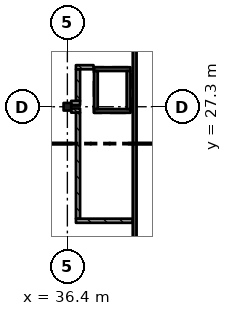
"""IFC4 building model, lengths in metres.
Left out: names, types, materials, properties, quantities, classifications, styles, units other than length and angle.
Written with IfcOpenShell. Run it as: python <this file> out.ifc"""

import sys

from ifc_helpers import new_model, si_unit, direction, frame, frame_2d, origin, origin_2d, place, context, subcontext, project, spatial, rectangle, extrude, element, fill, save


model = new_model("IFC4")
c1 = context("Model", 3, precision=1e-05, world=origin(), true_north=direction((0.0, 1.0)))
c2 = subcontext(c1, "Body", "Model", "MODEL_VIEW")
j1 = project(units=[si_unit("LENGTHUNIT", "METRE"), si_unit("PLANEANGLEUNIT", "RADIAN")], contexts=[c1])
p1 = place(None, origin())
s1 = spatial("IfcSite", under=j1, at=p1, CompositionType="ELEMENT")
p2 = place(p1, origin())
s2 = spatial("IfcBuilding", under=s1, at=p2, CompositionType="ELEMENT")
p3 = place(p2, frame((0.0, 0.0, 29.12)))
s3 = spatial("IfcBuildingStorey", under=s2, at=p3, CompositionType="ELEMENT", Elevation=29.12)
p4 = place(p3, frame((36.4, 27.3, 0.0), z_axis=(0.0, 0.0, 1.0), x_axis=(1.0, 0.0, 0.0)))
e1 = element("IfcColumn", 1, at=p4, inside=s3, PredefinedType="COLUMN", context=c2, shape_type="SweptSolid", body=[
    extrude(rectangle(XDim=0.5, YDim=0.5, at=origin_2d()), origin(), (0.0, 0.0, 1.0), 4.55),
])
p5 = place(p3, frame((40.825, 40.95, 0.0), z_axis=(0.0, 0.0, 1.0), x_axis=(0.0, -1.0, 0.0)))
e2 = element("IfcWall", 2, at=p5, inside=s3, PredefinedType="SHEAR", context=c2, shape_type="SweptSolid", body=[
    extrude(rectangle(XDim=40.775, YDim=0.25, at=frame_2d((20.387, 0.0))), origin(), (0.0, 0.0, 1.0), 4.55),
])
p6 = place(p3, frame((40.55, 27.025, 0.0), z_axis=(0.0, 0.0, 1.0), x_axis=(-1.0, 0.0, 0.0)))
e3 = element("IfcWall", 3, at=p6, inside=s3, PredefinedType="SHEAR", context=c2, shape_type="SweptSolid", body=[
    extrude(rectangle(XDim=2.4, YDim=0.25, at=frame_2d((1.2, 0.0))), origin(), (0.0, 0.0, 1.0), 4.55),
])
p7 = place(p6, frame((0.75, 0.0, 0.0)))
e4 = element("IfcOpeningElement", 4, at=p7, cuts=e3, PredefinedType="OPENING", context=c2, shape_type="SweptSolid", body=[
    extrude(rectangle(XDim=0.9, YDim=2.1, at=frame_2d((0.45, 1.05))), frame((0.0, 0.135, 0.0), z_axis=(0.0, -1.0, 0.0), x_axis=(1.0, 0.0, 0.0)), (0.0, 0.0, 1.0), 0.27),
])
p8 = place(p3, frame((40.55, 29.775, 0.0), z_axis=(0.0, 0.0, 1.0), x_axis=(-1.0, 0.0, 0.0)))
e5 = element("IfcWall", 5, at=p8, inside=s3, PredefinedType="SHEAR", context=c2, shape_type="SweptSolid", body=[
    extrude(rectangle(XDim=2.4, YDim=0.25, at=frame_2d((1.2, 0.0))), origin(), (0.0, 0.0, 1.0), 4.55),
])
for number, where, z_axis, x_axis in (
    (6, (38.275, 29.65, 0.0), (0.0, 0.0, 1.0), (0.0, -1.0, 0.0)),
    (7, (40.425, 29.65, 0.0), (0.0, 0.0, 1.0), (0.0, -1.0, 0.0)),
):
    element("IfcWall", number, at=place(p3, frame(where, z_axis=z_axis, x_axis=x_axis)), inside=s3, PredefinedType="SHEAR", context=c2, shape_type="SweptSolid", body=[
        extrude(rectangle(XDim=2.5, YDim=0.25, at=frame_2d((1.25, 0.0))), origin(), (0.0, 0.0, 1.0), 4.55),
    ])
p9 = place(p3, frame((36.65, 27.05, 0.0), z_axis=(0.0, 0.0, 1.0), x_axis=(1.0, 0.0, 0.0)))
e8 = element("IfcWall", 8, at=p9, inside=s3, PredefinedType="SOLIDWALL", context=c2, shape_type="SweptSolid", body=[
    extrude(rectangle(XDim=0.588, YDim=0.275, at=frame_2d((0.294, 0.0))), origin(), (0.0, 0.0, 1.0), 3.88),
])
p10 = place(p3, frame((36.962, 19.8, 0.0), z_axis=(0.0, 0.0, 1.0), x_axis=(1.0, 0.0, 0.0)))
e9 = element("IfcWall", 9, at=p10, inside=s3, PredefinedType="SOLIDWALL", context=c2, shape_type="SweptSolid", body=[
    extrude(rectangle(XDim=3.738, YDim=0.275, at=frame_2d((1.869, 0.0))), origin(), (0.0, 0.0, 1.0), 3.88),
])
p11 = place(p10, frame((1.25, 0.0, 0.0)))
e10 = element("IfcOpeningElement", 10, at=p11, cuts=e9, PredefinedType="OPENING", context=c2, shape_type="SweptSolid", body=[
    extrude(rectangle(XDim=1.2, YDim=2.4, at=frame_2d((0.6, 1.2))), frame((0.0, 0.147, 0.0), z_axis=(0.0, -1.0, 0.0), x_axis=(1.0, 0.0, 0.0)), (0.0, 0.0, 1.0), 0.295),
])
p12 = place(p3, frame((36.962, 29.9, 0.0), z_axis=(0.0, 0.0, 1.0), x_axis=(1.0, 0.0, 0.0)))
e11 = element("IfcWall", 11, at=p12, inside=s3, PredefinedType="SOLIDWALL", context=c2, shape_type="SweptSolid", body=[
    extrude(rectangle(XDim=1.158, YDim=0.275, at=frame_2d((0.579, 0.0))), origin(), (0.0, 0.0, 1.0), 3.88),
])
p13 = place(p3, frame((37.1, 26.913, 0.0), z_axis=(0.0, 0.0, 1.0), x_axis=(0.0, -1.0, 0.0)))
e12 = element("IfcWall", 12, at=p13, inside=s3, PredefinedType="SOLIDWALL", context=c2, shape_type="SweptSolid", body=[
    extrude(rectangle(XDim=6.975, YDim=0.275, at=frame_2d((3.488, 0.0))), origin(), (0.0, 0.0, 1.0), 3.88),
])
p14 = place(p3, frame((37.1, 29.762, 0.0), z_axis=(0.0, 0.0, 1.0), x_axis=(0.0, -1.0, 0.0)))
e13 = element("IfcWall", 13, at=p14, inside=s3, PredefinedType="SOLIDWALL", context=c2, shape_type="SweptSolid", body=[
    extrude(rectangle(XDim=2.075, YDim=0.275, at=frame_2d((1.038, 0.0))), origin(), (0.0, 0.0, 1.0), 3.88),
])
p15 = place(p3, frame((37.238, 27.55, 0.0), z_axis=(0.0, 0.0, 1.0), x_axis=(-1.0, 0.0, 0.0)))
e14 = element("IfcWall", 14, at=p15, inside=s3, PredefinedType="SOLIDWALL", context=c2, shape_type="SweptSolid", body=[
    extrude(rectangle(XDim=0.588, YDim=0.275, at=frame_2d((0.294, 0.0))), origin(), (0.0, 0.0, 1.0), 3.88),
])
p16 = place(p11, origin())
e15 = element("IfcDoor", 15, at=p16, inside=s3, OperationType="SINGLE_SWING_RIGHT", PredefinedType="DOOR", context=c2, shape_type="SweptSolid", body=[
    extrude(rectangle(XDim=1.2, YDim=2.4, at=frame_2d((0.6, 1.2))), frame((0.0, 0.025, 0.0), z_axis=(0.0, -1.0, 0.0), x_axis=(1.0, 0.0, 0.0)), (0.0, 0.0, 1.0), 0.05),
])
fill(e10, e15)
p17 = place(p7, origin())
e16 = element("IfcDoor", 16, at=p17, inside=s3, OperationType="SINGLE_SWING_RIGHT", PredefinedType="DOOR", context=c2, shape_type="SweptSolid", body=[
    extrude(rectangle(XDim=0.9, YDim=2.1, at=frame_2d((0.45, 1.05))), frame((0.0, 0.025, 0.0), z_axis=(0.0, -1.0, 0.0), x_axis=(1.0, 0.0, 0.0)), (0.0, 0.0, 1.0), 0.05),
])
fill(e4, e16)
save(model, sys.argv[1])
